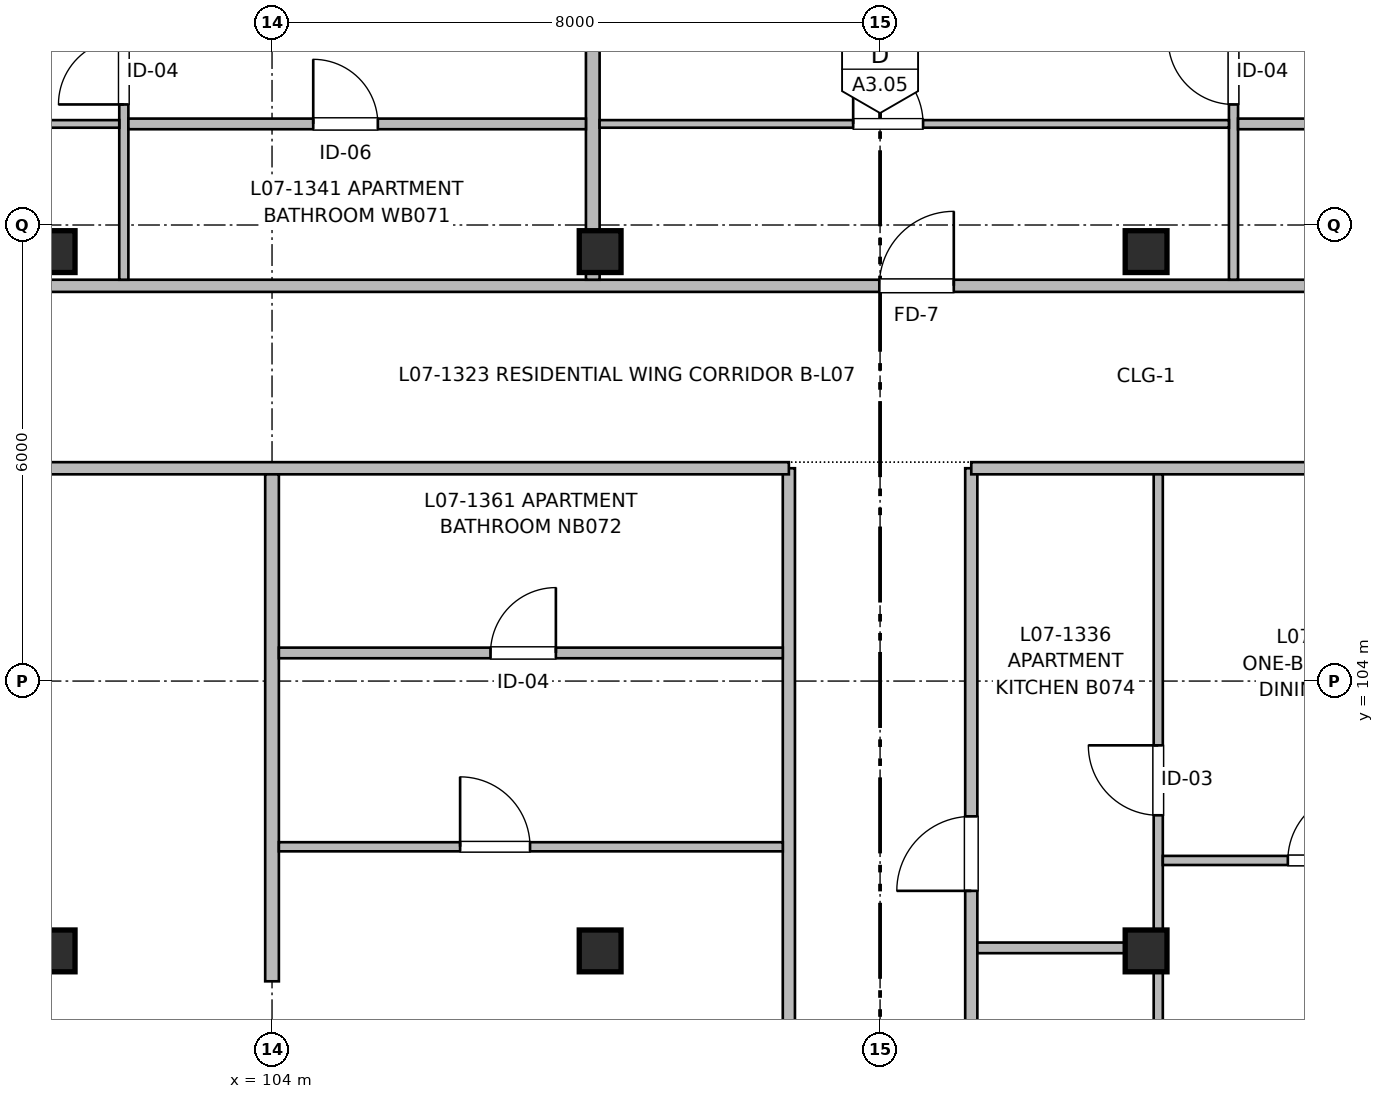
"""IFC4 building model, lengths in metres.
Left out: names, types, materials, properties, quantities, classifications, styles, units other than length and angle.
Written with IfcOpenShell. Run it as: python <this file> out.ifc"""

import sys

from ifc_helpers import new_model, si_unit, direction, frame, frame_2d, origin, origin_2d, place, context, subcontext, project, spatial, rectangle, extrude, element, fill, save


model = new_model("IFC4")
c1 = context("Model", 3, precision=1e-05, world=origin(), true_north=direction((0.0, 1.0)))
c2 = subcontext(c1, "Body", "Model", "MODEL_VIEW")
j1 = project(units=[si_unit("LENGTHUNIT", "METRE"), si_unit("PLANEANGLEUNIT", "RADIAN")], contexts=[c1])
p1 = place(None, origin())
s1 = spatial("IfcSite", under=j1, at=p1, CompositionType="ELEMENT")
p2 = place(p1, origin())
s2 = spatial("IfcBuilding", under=s1, at=p2, CompositionType="ELEMENT")
p3 = place(p2, frame((0.0, 0.0, 23.36)))
s3 = spatial("IfcBuildingStorey", under=s2, at=p3, CompositionType="ELEMENT", Elevation=23.36)
for number, where, z_axis, x_axis in (
    (1, (101.133, 100.45, 0.0), (0.0, 0.0, 1.0), (1.0, 0.0, 0.0)),
    (2, (101.133, 109.65, 0.0), (0.0, 0.0, 1.0), (1.0, 0.0, 0.0)),
    (3, (108.317, 100.45, 0.0), (0.0, 0.0, 1.0), (1.0, 0.0, 0.0)),
    (4, (108.317, 109.65, 0.0), (0.0, 0.0, 1.0), (1.0, 0.0, 0.0)),
    (5, (115.5, 100.45, 0.0), (0.0, 0.0, 1.0), (1.0, 0.0, 0.0)),
    (6, (115.5, 109.65, 0.0), (0.0, 0.0, 1.0), (1.0, 0.0, 0.0)),
):
    element("IfcColumn", number, at=place(p3, frame(where, z_axis=z_axis, x_axis=x_axis)), inside=s3, PredefinedType="COLUMN", context=c2, shape_type="SweptSolid", body=[
        extrude(rectangle(XDim=0.55, YDim=0.55, at=origin_2d()), origin(), (0.0, 0.0, 1.0), 3.2),
    ])
p4 = place(p3, frame((110.8, 56.16, 0.0), z_axis=(0.0, 0.0, 1.0), x_axis=(0.0, 1.0, 0.0)))
e7 = element("IfcWall", 7, at=p4, inside=s3, PredefinedType="PARTITIONING", context=c2, shape_type="SweptSolid", body=[
    extrude(rectangle(XDim=50.64, YDim=0.16, at=frame_2d((25.32, 0.0))), origin(), (0.0, 0.0, 1.0), 2.935),
])
p5 = place(p4, frame((12.84, 0.0, 0.0)))
e8 = element("IfcOpeningElement", 8, at=p5, cuts=e7, PredefinedType="OPENING", context=c2, shape_type="SweptSolid", body=[
    extrude(rectangle(XDim=1.1, YDim=2.15, at=frame_2d((0.55, 1.075))), frame((0.0, 0.09, 0.0), z_axis=(0.0, -1.0, 0.0), x_axis=(1.0, 0.0, 0.0)), (0.0, 0.0, 1.0), 0.18),
])
p6 = place(p4, frame((19.24, 0.0, 0.0)))
e9 = element("IfcOpeningElement", 9, at=p6, cuts=e7, PredefinedType="OPENING", context=c2, shape_type="SweptSolid", body=[
    extrude(rectangle(XDim=1.6, YDim=2.15, at=frame_2d((0.8, 1.075))), frame((0.0, 0.09, 0.0), z_axis=(0.0, -1.0, 0.0), x_axis=(1.0, 0.0, 0.0)), (0.0, 0.0, 1.0), 0.18),
])
p7 = place(p4, frame((1.8, 0.0, 0.0)))
e10 = element("IfcOpeningElement", 10, at=p7, cuts=e7, PredefinedType="OPENING", context=c2, shape_type="SweptSolid", body=[
    extrude(rectangle(XDim=0.96, YDim=2.15, at=frame_2d((0.48, 1.075))), frame((0.0, 0.09, 0.0), z_axis=(0.0, -1.0, 0.0), x_axis=(1.0, 0.0, 0.0)), (0.0, 0.0, 1.0), 0.18),
])
p8 = place(p4, frame((32.745, 0.0, 0.0)))
e11 = element("IfcOpeningElement", 11, at=p8, cuts=e7, PredefinedType="OPENING", context=c2, shape_type="SweptSolid", body=[
    extrude(rectangle(XDim=0.98, YDim=2.15, at=frame_2d((0.49, 1.075))), frame((0.0, 0.09, 0.0), z_axis=(0.0, -1.0, 0.0), x_axis=(1.0, 0.0, 0.0)), (0.0, 0.0, 1.0), 0.18),
])
p9 = place(p4, frame((40.955, 0.0, 0.0)))
e12 = element("IfcOpeningElement", 12, at=p9, cuts=e7, PredefinedType="OPENING", context=c2, shape_type="SweptSolid", body=[
    extrude(rectangle(XDim=0.98, YDim=2.15, at=frame_2d((0.49, 1.075))), frame((0.0, 0.09, 0.0), z_axis=(0.0, -1.0, 0.0), x_axis=(1.0, 0.0, 0.0)), (0.0, 0.0, 1.0), 0.18),
])
p10 = place(p3, frame((113.2, 56.16, 0.0), z_axis=(0.0, 0.0, 1.0), x_axis=(0.0, 1.0, 0.0)))
e13 = element("IfcWall", 13, at=p10, inside=s3, PredefinedType="PARTITIONING", context=c2, shape_type="SweptSolid", body=[
    extrude(rectangle(XDim=50.64, YDim=0.16, at=frame_2d((25.32, 0.0))), origin(), (0.0, 0.0, 1.0), 2.935),
])
p11 = place(p10, frame((6.03, 0.0, 0.0)))
e14 = element("IfcOpeningElement", 14, at=p11, cuts=e13, PredefinedType="OPENING", context=c2, shape_type="SweptSolid", body=[
    extrude(rectangle(XDim=1.5, YDim=2.2, at=frame_2d((0.75, 1.1))), frame((0.0, 0.09, 0.0), z_axis=(0.0, -1.0, 0.0), x_axis=(1.0, 0.0, 0.0)), (0.0, 0.0, 1.0), 0.18),
])
p12 = place(p10, frame((20.92, 0.0, 0.0)))
e15 = element("IfcOpeningElement", 15, at=p12, cuts=e13, PredefinedType="OPENING", context=c2, shape_type="SweptSolid", body=[
    extrude(rectangle(XDim=1.02, YDim=2.15, at=frame_2d((0.51, 1.075))), frame((0.0, 0.09, 0.0), z_axis=(0.0, -1.0, 0.0), x_axis=(1.0, 0.0, 0.0)), (0.0, 0.0, 1.0), 0.18),
])
p13 = place(p10, frame((33.68, 0.0, 0.0)))
e16 = element("IfcOpeningElement", 16, at=p13, cuts=e13, PredefinedType="OPENING", context=c2, shape_type="SweptSolid", body=[
    extrude(rectangle(XDim=0.98, YDim=2.15, at=frame_2d((0.49, 1.075))), frame((0.0, 0.09, 0.0), z_axis=(0.0, -1.0, 0.0), x_axis=(1.0, 0.0, 0.0)), (0.0, 0.0, 1.0), 0.18),
])
p14 = place(p10, frame((45.08, 0.0, 0.0)))
e17 = element("IfcOpeningElement", 17, at=p14, cuts=e13, PredefinedType="OPENING", context=c2, shape_type="SweptSolid", body=[
    extrude(rectangle(XDim=0.98, YDim=2.15, at=frame_2d((0.49, 1.075))), frame((0.0, 0.09, 0.0), z_axis=(0.0, -1.0, 0.0), x_axis=(1.0, 0.0, 0.0)), (0.0, 0.0, 1.0), 0.18),
])
p15 = place(p3, frame((93.66, 106.8, 0.0), z_axis=(0.0, 0.0, 1.0), x_axis=(1.0, 0.0, 0.0)))
e18 = element("IfcWall", 18, at=p15, inside=s3, PredefinedType="PARTITIONING", context=c2, shape_type="SweptSolid", body=[
    extrude(rectangle(XDim=17.14, YDim=0.16, at=frame_2d((8.57, 0.0))), origin(), (0.0, 0.0, 1.0), 2.935),
])
p16 = place(p3, frame((113.2, 106.8, 0.0), z_axis=(0.0, 0.0, 1.0), x_axis=(1.0, 0.0, 0.0)))
e19 = element("IfcWall", 19, at=p16, inside=s3, PredefinedType="PARTITIONING", context=c2, shape_type="SweptSolid", body=[
    extrude(rectangle(XDim=24.14, YDim=0.16, at=frame_2d((12.07, 0.0))), origin(), (0.0, 0.0, 1.0), 2.935),
])
p17 = place(p16, frame((19.575, 0.0, 0.0)))
e20 = element("IfcOpeningElement", 20, at=p17, cuts=e19, PredefinedType="OPENING", context=c2, shape_type="SweptSolid", body=[
    extrude(rectangle(XDim=1.05, YDim=2.15, at=frame_2d((0.525, 1.075))), frame((0.0, 0.09, 0.0), z_axis=(0.0, -1.0, 0.0), x_axis=(1.0, 0.0, 0.0)), (0.0, 0.0, 1.0), 0.18),
])
p18 = place(p16, frame((8.995, 0.0, 0.0)))
e21 = element("IfcOpeningElement", 21, at=p18, cuts=e19, PredefinedType="OPENING", context=c2, shape_type="SweptSolid", body=[
    extrude(rectangle(XDim=0.98, YDim=2.15, at=frame_2d((0.49, 1.075))), frame((0.0, 0.09, 0.0), z_axis=(0.0, -1.0, 0.0), x_axis=(1.0, 0.0, 0.0)), (0.0, 0.0, 1.0), 0.18),
])
p19 = place(p3, frame((93.66, 109.2, 0.0), z_axis=(0.0, 0.0, 1.0), x_axis=(1.0, 0.0, 0.0)))
e22 = element("IfcWall", 22, at=p19, inside=s3, PredefinedType="PARTITIONING", context=c2, shape_type="SweptSolid", body=[
    extrude(rectangle(XDim=43.68, YDim=0.16, at=frame_2d((21.84, 0.0))), origin(), (0.0, 0.0, 1.0), 2.935),
])
p20 = place(p19, frame((3.705, 0.0, 0.0)))
e23 = element("IfcOpeningElement", 23, at=p20, cuts=e22, PredefinedType="OPENING", context=c2, shape_type="SweptSolid", body=[
    extrude(rectangle(XDim=0.98, YDim=2.15, at=frame_2d((0.49, 1.075))), frame((0.0, 0.09, 0.0), z_axis=(0.0, -1.0, 0.0), x_axis=(1.0, 0.0, 0.0)), (0.0, 0.0, 1.0), 0.18),
])
p21 = place(p19, frame((18.33, 0.0, 0.0)))
e24 = element("IfcOpeningElement", 24, at=p21, cuts=e22, PredefinedType="OPENING", context=c2, shape_type="SweptSolid", body=[
    extrude(rectangle(XDim=0.98, YDim=2.15, at=frame_2d((0.49, 1.075))), frame((0.0, 0.09, 0.0), z_axis=(0.0, -1.0, 0.0), x_axis=(1.0, 0.0, 0.0)), (0.0, 0.0, 1.0), 0.18),
])
p22 = place(p19, frame((32.915, 0.0, 0.0)))
e25 = element("IfcOpeningElement", 25, at=p22, cuts=e22, PredefinedType="OPENING", context=c2, shape_type="SweptSolid", body=[
    extrude(rectangle(XDim=0.98, YDim=2.15, at=frame_2d((0.49, 1.075))), frame((0.0, 0.09, 0.0), z_axis=(0.0, -1.0, 0.0), x_axis=(1.0, 0.0, 0.0)), (0.0, 0.0, 1.0), 0.18),
])
p23 = place(p3, frame((104.0, 100.05, 0.0), z_axis=(0.0, 0.0, 1.0), x_axis=(0.0, 1.0, 0.0)))
e26 = element("IfcWall", 26, at=p23, inside=s3, PredefinedType="PARTITIONING", context=c2, shape_type="SweptSolid", body=[
    extrude(rectangle(XDim=6.67, YDim=0.18, at=frame_2d((3.335, 0.0))), origin(), (0.0, 0.0, 1.0), 2.935),
])
p24 = place(p3, frame((115.66, 95.18, 0.0), z_axis=(0.0, 0.0, 1.0), x_axis=(0.0, 1.0, 0.0)))
e27 = element("IfcWall", 27, at=p24, inside=s3, PredefinedType="PARTITIONING", context=c2, shape_type="SweptSolid", body=[
    extrude(rectangle(XDim=11.54, YDim=0.12, at=frame_2d((5.77, 0.0))), origin(), (0.0, 0.0, 1.0), 2.68),
])
p25 = place(p24, frame((2.018, 0.0, 0.0)))
e28 = element("IfcOpeningElement", 28, at=p25, cuts=e27, PredefinedType="OPENING", context=c2, shape_type="SweptSolid", body=[
    extrude(rectangle(XDim=0.86, YDim=2.1, at=frame_2d((0.43, 1.05))), frame((0.0, 0.07, 0.0), z_axis=(0.0, -1.0, 0.0), x_axis=(1.0, 0.0, 0.0)), (0.0, 0.0, 1.0), 0.14),
])
p26 = place(p24, frame((7.054, 0.0, 0.0)))
e29 = element("IfcOpeningElement", 29, at=p26, cuts=e27, PredefinedType="OPENING", context=c2, shape_type="SweptSolid", body=[
    extrude(rectangle(XDim=0.92, YDim=2.1, at=frame_2d((0.46, 1.05))), frame((0.0, 0.07, 0.0), z_axis=(0.0, -1.0, 0.0), x_axis=(1.0, 0.0, 0.0)), (0.0, 0.0, 1.0), 0.14),
])
p27 = place(p3, frame((113.28, 100.49, 0.0), z_axis=(0.0, 0.0, 1.0), x_axis=(1.0, 0.0, 0.0)))
e30 = element("IfcWall", 30, at=p27, inside=s3, PredefinedType="PARTITIONING", context=c2, shape_type="SweptSolid", body=[
    extrude(rectangle(XDim=2.32, YDim=0.14, at=frame_2d((1.16, 0.0))), origin(), (0.0, 0.0, 1.0), 2.73),
])
p28 = place(p3, frame((115.72, 101.64, 0.0), z_axis=(0.0, 0.0, 1.0), x_axis=(1.0, 0.0, 0.0)))
e31 = element("IfcWall", 31, at=p28, inside=s3, PredefinedType="PARTITIONING", context=c2, shape_type="SweptSolid", body=[
    extrude(rectangle(XDim=4.19, YDim=0.12, at=frame_2d((2.095, 0.0))), origin(), (0.0, 0.0, 1.0), 2.935),
])
p29 = place(p28, frame((1.645, 0.0, 0.0)))
e32 = element("IfcOpeningElement", 32, at=p29, cuts=e31, PredefinedType="OPENING", context=c2, shape_type="SweptSolid", body=[
    extrude(rectangle(XDim=0.9, YDim=2.1, at=frame_2d((0.45, 1.05))), frame((0.0, 0.07, 0.0), z_axis=(0.0, -1.0, 0.0), x_axis=(1.0, 0.0, 0.0)), (0.0, 0.0, 1.0), 0.14),
])
p30 = place(p3, frame((108.22, 109.28, 0.0), z_axis=(0.0, 0.0, 1.0), x_axis=(0.0, 1.0, 0.0)))
e33 = element("IfcWall", 33, at=p30, inside=s3, PredefinedType="PARTITIONING", context=c2, shape_type="SweptSolid", body=[
    extrude(rectangle(XDim=6.6, YDim=0.18, at=frame_2d((3.3, 0.0))), origin(), (0.0, 0.0, 1.0), 2.68),
])
p31 = place(p3, frame((102.05, 109.28, 0.0), z_axis=(0.0, 0.0, 1.0), x_axis=(0.0, 1.0, 0.0)))
e34 = element("IfcWall", 34, at=p31, inside=s3, PredefinedType="PARTITIONING", context=c2, shape_type="SweptSolid", body=[
    extrude(rectangle(XDim=6.6, YDim=0.12, at=frame_2d((3.3, 0.0))), origin(), (0.0, 0.0, 1.0), 2.935),
])
p32 = place(p31, frame((2.306, 0.0, 0.0)))
e35 = element("IfcOpeningElement", 35, at=p32, cuts=e34, PredefinedType="OPENING", context=c2, shape_type="SweptSolid", body=[
    extrude(rectangle(XDim=0.86, YDim=2.1, at=frame_2d((0.43, 1.05))), frame((0.0, 0.07, 0.0), z_axis=(0.0, -1.0, 0.0), x_axis=(1.0, 0.0, 0.0)), (0.0, 0.0, 1.0), 0.14),
])
p33 = place(p31, frame((4.097, 0.0, 0.0)))
e36 = element("IfcOpeningElement", 36, at=p33, cuts=e34, PredefinedType="OPENING", context=c2, shape_type="SweptSolid", body=[
    extrude(rectangle(XDim=0.9, YDim=2.1, at=frame_2d((0.45, 1.05))), frame((0.0, 0.07, 0.0), z_axis=(0.0, -1.0, 0.0), x_axis=(1.0, 0.0, 0.0)), (0.0, 0.0, 1.0), 0.14),
])
p34 = place(p3, frame((102.11, 111.33, 0.0), z_axis=(0.0, 0.0, 1.0), x_axis=(1.0, 0.0, 0.0)))
e37 = element("IfcWall", 37, at=p34, inside=s3, PredefinedType="PARTITIONING", context=c2, shape_type="SweptSolid", body=[
    extrude(rectangle(XDim=6.02, YDim=0.14, at=frame_2d((3.01, 0.0))), origin(), (0.0, 0.0, 1.0), 2.935),
])
p35 = place(p34, frame((2.432, 0.0, 0.0)))
e38 = element("IfcOpeningElement", 38, at=p35, cuts=e37, PredefinedType="OPENING", context=c2, shape_type="SweptSolid", body=[
    extrude(rectangle(XDim=0.85, YDim=2.05, at=frame_2d((0.425, 1.025))), frame((0.0, 0.08, 0.0), z_axis=(0.0, -1.0, 0.0), x_axis=(1.0, 0.0, 0.0)), (0.0, 0.0, 1.0), 0.16),
])
p36 = place(p3, frame((93.66, 111.33, 0.0), z_axis=(0.0, 0.0, 1.0), x_axis=(1.0, 0.0, 0.0)))
e39 = element("IfcWall", 39, at=p36, inside=s3, PredefinedType="PARTITIONING", context=c2, shape_type="SweptSolid", body=[
    extrude(rectangle(XDim=8.33, YDim=0.1, at=frame_2d((4.165, 0.0))), origin(), (0.0, 0.0, 1.0), 2.935),
])
p37 = place(p36, frame((3.356, 0.0, 0.0)))
e40 = element("IfcOpeningElement", 40, at=p37, cuts=e39, PredefinedType="OPENING", context=c2, shape_type="SweptSolid", body=[
    extrude(rectangle(XDim=0.92, YDim=2.1, at=frame_2d((0.46, 1.05))), frame((0.0, 0.06, 0.0), z_axis=(0.0, -1.0, 0.0), x_axis=(1.0, 0.0, 0.0)), (0.0, 0.0, 1.0), 0.12),
])
p38 = place(p3, frame((116.65, 109.28, 0.0), z_axis=(0.0, 0.0, 1.0), x_axis=(0.0, 1.0, 0.0)))
e41 = element("IfcWall", 41, at=p38, inside=s3, PredefinedType="PARTITIONING", context=c2, shape_type="SweptSolid", body=[
    extrude(rectangle(XDim=6.6, YDim=0.12, at=frame_2d((3.3, 0.0))), origin(), (0.0, 0.0, 1.0), 2.935),
])
p39 = place(p38, frame((2.306, 0.0, 0.0)))
e42 = element("IfcOpeningElement", 42, at=p39, cuts=e41, PredefinedType="OPENING", context=c2, shape_type="SweptSolid", body=[
    extrude(rectangle(XDim=0.86, YDim=2.1, at=frame_2d((0.43, 1.05))), frame((0.0, 0.07, 0.0), z_axis=(0.0, -1.0, 0.0), x_axis=(1.0, 0.0, 0.0)), (0.0, 0.0, 1.0), 0.14),
])
p40 = place(p38, frame((4.097, 0.0, 0.0)))
e43 = element("IfcOpeningElement", 43, at=p40, cuts=e41, PredefinedType="OPENING", context=c2, shape_type="SweptSolid", body=[
    extrude(rectangle(XDim=0.9, YDim=2.1, at=frame_2d((0.45, 1.05))), frame((0.0, 0.07, 0.0), z_axis=(0.0, -1.0, 0.0), x_axis=(1.0, 0.0, 0.0)), (0.0, 0.0, 1.0), 0.14),
])
p41 = place(p3, frame((116.71, 111.33, 0.0), z_axis=(0.0, 0.0, 1.0), x_axis=(1.0, 0.0, 0.0)))
e44 = element("IfcWall", 44, at=p41, inside=s3, PredefinedType="PARTITIONING", context=c2, shape_type="SweptSolid", body=[
    extrude(rectangle(XDim=5.98, YDim=0.14, at=frame_2d((2.99, 0.0))), origin(), (0.0, 0.0, 1.0), 2.935),
])
p42 = place(p41, frame((2.416, 0.0, 0.0)))
e45 = element("IfcOpeningElement", 45, at=p42, cuts=e44, PredefinedType="OPENING", context=c2, shape_type="SweptSolid", body=[
    extrude(rectangle(XDim=0.85, YDim=2.05, at=frame_2d((0.425, 1.025))), frame((0.0, 0.08, 0.0), z_axis=(0.0, -1.0, 0.0), x_axis=(1.0, 0.0, 0.0)), (0.0, 0.0, 1.0), 0.16),
])
p43 = place(p3, frame((108.31, 111.33, 0.0), z_axis=(0.0, 0.0, 1.0), x_axis=(1.0, 0.0, 0.0)))
e46 = element("IfcWall", 46, at=p43, inside=s3, PredefinedType="PARTITIONING", context=c2, shape_type="SweptSolid", body=[
    extrude(rectangle(XDim=8.28, YDim=0.1, at=frame_2d((4.14, 0.0))), origin(), (0.0, 0.0, 1.0), 2.935),
])
p44 = place(p43, frame((3.336, 0.0, 0.0)))
e47 = element("IfcOpeningElement", 47, at=p44, cuts=e46, PredefinedType="OPENING", context=c2, shape_type="SweptSolid", body=[
    extrude(rectangle(XDim=0.92, YDim=2.1, at=frame_2d((0.46, 1.05))), frame((0.0, 0.06, 0.0), z_axis=(0.0, -1.0, 0.0), x_axis=(1.0, 0.0, 0.0)), (0.0, 0.0, 1.0), 0.12),
])
p45 = place(p3, frame((104.09, 101.82, 0.0), z_axis=(0.0, 0.0, 1.0), x_axis=(1.0, 0.0, 0.0)))
e48 = element("IfcWall", 48, at=p45, inside=s3, PredefinedType="PARTITIONING", context=c2, shape_type="SweptSolid", body=[
    extrude(rectangle(XDim=6.63, YDim=0.12, at=frame_2d((3.315, 0.0))), origin(), (0.0, 0.0, 1.0), 2.935),
])
p46 = place(p45, frame((2.385, 0.0, 0.0)))
e49 = element("IfcOpeningElement", 49, at=p46, cuts=e48, PredefinedType="OPENING", context=c2, shape_type="SweptSolid", body=[
    extrude(rectangle(XDim=0.92, YDim=2.1, at=frame_2d((0.46, 1.05))), frame((0.0, 0.07, 0.0), z_axis=(0.0, -1.0, 0.0), x_axis=(1.0, 0.0, 0.0)), (0.0, 0.0, 1.0), 0.14),
])
p47 = place(p3, frame((104.09, 104.37, 0.0), z_axis=(0.0, 0.0, 1.0), x_axis=(1.0, 0.0, 0.0)))
e50 = element("IfcWall", 50, at=p47, inside=s3, PredefinedType="PARTITIONING", context=c2, shape_type="SweptSolid", body=[
    extrude(rectangle(XDim=6.63, YDim=0.14, at=frame_2d((3.315, 0.0))), origin(), (0.0, 0.0, 1.0), 2.935),
])
p48 = place(p47, frame((2.785, 0.0, 0.0)))
e51 = element("IfcOpeningElement", 51, at=p48, cuts=e50, PredefinedType="OPENING", context=c2, shape_type="SweptSolid", body=[
    extrude(rectangle(XDim=0.86, YDim=2.1, at=frame_2d((0.43, 1.05))), frame((0.0, 0.08, 0.0), z_axis=(0.0, -1.0, 0.0), x_axis=(1.0, 0.0, 0.0)), (0.0, 0.0, 1.0), 0.16),
])
p49 = place(p26, origin())
e52 = element("IfcDoor", 52, at=p49, inside=s3, OperationType="SINGLE_SWING_RIGHT", PredefinedType="DOOR", context=c2, shape_type="SweptSolid", body=[
    extrude(rectangle(XDim=0.92, YDim=2.1, at=frame_2d((0.46, 1.05))), frame((0.0, 0.025, 0.0), z_axis=(0.0, -1.0, 0.0), x_axis=(1.0, 0.0, 0.0)), (0.0, 0.0, 1.0), 0.05),
])
fill(e29, e52)
p50 = place(p14, origin())
e53 = element("IfcDoor", 53, at=p50, inside=s3, OperationType="SINGLE_SWING_LEFT", PredefinedType="DOOR", context=c2, shape_type="SweptSolid", body=[
    extrude(rectangle(XDim=0.98, YDim=2.15, at=frame_2d((0.49, 1.075))), frame((0.0, 0.025, 0.0), z_axis=(0.0, -1.0, 0.0), x_axis=(1.0, 0.0, 0.0)), (0.0, 0.0, 1.0), 0.05),
])
fill(e17, e53)
p51 = place(p29, origin())
e54 = element("IfcDoor", 54, at=p51, inside=s3, OperationType="SINGLE_SWING_RIGHT", PredefinedType="DOOR", context=c2, shape_type="SweptSolid", body=[
    extrude(rectangle(XDim=0.9, YDim=2.1, at=frame_2d((0.45, 1.05))), frame((0.0, 0.025, 0.0), z_axis=(0.0, -1.0, 0.0), x_axis=(1.0, 0.0, 0.0)), (0.0, 0.0, 1.0), 0.05),
])
fill(e32, e54)
p52 = place(p32, origin())
e55 = element("IfcDoor", 55, at=p52, inside=s3, OperationType="SINGLE_SWING_LEFT", PredefinedType="DOOR", context=c2, shape_type="SweptSolid", body=[
    extrude(rectangle(XDim=0.86, YDim=2.1, at=frame_2d((0.43, 1.05))), frame((0.0, 0.025, 0.0), z_axis=(0.0, -1.0, 0.0), x_axis=(1.0, 0.0, 0.0)), (0.0, 0.0, 1.0), 0.05),
])
fill(e35, e55)
p53 = place(p35, origin())
e56 = element("IfcDoor", 56, at=p53, inside=s3, OperationType="SINGLE_SWING_LEFT", PredefinedType="DOOR", context=c2, shape_type="SweptSolid", body=[
    extrude(rectangle(XDim=0.85, YDim=2.05, at=frame_2d((0.425, 1.025))), frame((0.0, 0.025, 0.0), z_axis=(0.0, -1.0, 0.0), x_axis=(1.0, 0.0, 0.0)), (0.0, 0.0, 1.0), 0.05),
])
fill(e38, e56)
p54 = place(p21, origin())
e57 = element("IfcDoor", 57, at=p54, inside=s3, OperationType="SINGLE_SWING_RIGHT", PredefinedType="DOOR", context=c2, shape_type="SweptSolid", body=[
    extrude(rectangle(XDim=0.98, YDim=2.15, at=frame_2d((0.49, 1.075))), frame((0.0, 0.025, 0.0), z_axis=(0.0, -1.0, 0.0), x_axis=(1.0, 0.0, 0.0)), (0.0, 0.0, 1.0), 0.05),
])
fill(e24, e57)
p55 = place(p44, origin())
e58 = element("IfcDoor", 58, at=p55, inside=s3, OperationType="SINGLE_SWING_LEFT", PredefinedType="DOOR", context=c2, shape_type="SweptSolid", body=[
    extrude(rectangle(XDim=0.92, YDim=2.1, at=frame_2d((0.46, 1.05))), frame((0.0, 0.025, 0.0), z_axis=(0.0, -1.0, 0.0), x_axis=(1.0, 0.0, 0.0)), (0.0, 0.0, 1.0), 0.05),
])
fill(e47, e58)
p56 = place(p39, origin())
e59 = element("IfcDoor", 59, at=p56, inside=s3, OperationType="SINGLE_SWING_RIGHT", PredefinedType="DOOR", context=c2, shape_type="SweptSolid", body=[
    extrude(rectangle(XDim=0.86, YDim=2.1, at=frame_2d((0.43, 1.05))), frame((0.0, 0.025, 0.0), z_axis=(0.0, -1.0, 0.0), x_axis=(1.0, 0.0, 0.0)), (0.0, 0.0, 1.0), 0.05),
])
fill(e42, e59)
p57 = place(p48, origin())
e60 = element("IfcDoor", 60, at=p57, inside=s3, OperationType="SINGLE_SWING_RIGHT", PredefinedType="DOOR", context=c2, shape_type="SweptSolid", body=[
    extrude(rectangle(XDim=0.86, YDim=2.1, at=frame_2d((0.43, 1.05))), frame((0.0, 0.025, 0.0), z_axis=(0.0, -1.0, 0.0), x_axis=(1.0, 0.0, 0.0)), (0.0, 0.0, 1.0), 0.05),
])
fill(e51, e60)
p58 = place(p46, origin())
e61 = element("IfcDoor", 61, at=p58, inside=s3, OperationType="SINGLE_SWING_LEFT", PredefinedType="DOOR", context=c2, shape_type="SweptSolid", body=[
    extrude(rectangle(XDim=0.92, YDim=2.1, at=frame_2d((0.46, 1.05))), frame((0.0, 0.025, 0.0), z_axis=(0.0, -1.0, 0.0), x_axis=(1.0, 0.0, 0.0)), (0.0, 0.0, 1.0), 0.05),
])
fill(e49, e61)
save(model, sys.argv[1])
